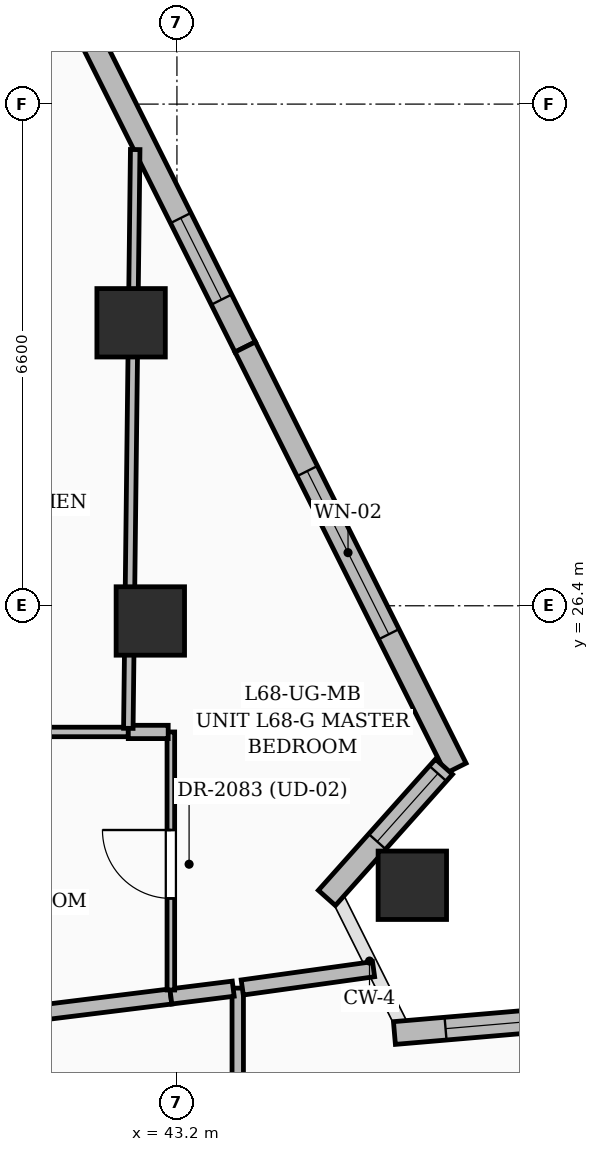
"""IFC4 building model, lengths in metres.
Left out: names, types, materials, properties, quantities, classifications, styles, units other than length and angle.
Written with IfcOpenShell. Run it as: python <this file> out.ifc"""

import sys

from ifc_helpers import new_model, si_unit, direction, frame, frame_2d, origin, origin_2d, place, context, subcontext, project, spatial, rectangle, extrude, element, fill, save


model = new_model("IFC4")
c1 = context("Model", 3, precision=1e-05, world=origin(), true_north=direction((0.0, 1.0)))
c2 = subcontext(c1, "Body", "Model", "MODEL_VIEW")
j1 = project(units=[si_unit("LENGTHUNIT", "METRE"), si_unit("PLANEANGLEUNIT", "RADIAN")], contexts=[c1])
p1 = place(None, origin())
s1 = spatial("IfcSite", under=j1, at=p1, CompositionType="ELEMENT")
p2 = place(p1, origin())
s2 = spatial("IfcBuilding", under=s1, at=p2, CompositionType="ELEMENT")
p3 = place(p2, frame((0.0, 0.0, 263.25)))
s3 = spatial("IfcBuildingStorey", under=s2, at=p3, CompositionType="ELEMENT", Elevation=263.25)
for number, where, z_axis, x_axis in (
    (1, (42.85, 26.2, 0.0), (0.0, 0.0, 1.0), (1.0, 0.0, 0.0)),
    (2, (46.297, 22.723, 0.0), (0.0, 0.0, 1.0), (1.0, 0.0, 0.0)),
    (3, (42.597, 30.123, 0.0), (0.0, 0.0, 1.0), (1.0, 0.0, 0.0)),
):
    element("IfcColumn", number, at=place(p3, frame(where, z_axis=z_axis, x_axis=x_axis)), inside=s3, PredefinedType="COLUMN", context=c2, shape_type="SweptSolid", body=[
        extrude(rectangle(XDim=0.9, YDim=0.9, at=origin_2d()), origin(), (0.0, 0.0, 1.0), 3.75),
    ])
p4 = place(p3, frame((41.59, 34.82, 0.0), z_axis=(0.0, 0.0, 1.0), x_axis=(0.4472135955, -0.894427191, 0.0)))
e4 = element("IfcWall", 4, at=p4, inside=s3, PredefinedType="SOLIDWALL", context=c2, shape_type="SweptSolid", body=[
    extrude(rectangle(XDim=5.607, YDim=0.3, at=frame_2d((2.804, 0.0))), origin(), (0.0, 0.0, 1.0), 3.5),
])
p5 = place(p4, frame((3.71, 0.0, 0.8)))
e5 = element("IfcOpeningElement", 5, at=p5, cuts=e4, PredefinedType="OPENING", context=c2, shape_type="SweptSolid", body=[
    extrude(rectangle(XDim=1.2, YDim=1.8, at=frame_2d((0.6, 0.9))), frame((0.0, 0.16, 0.0), z_axis=(0.0, -1.0, 0.0), x_axis=(1.0, 0.0, 0.0)), (0.0, 0.0, 1.0), 0.32),
])
p6 = place(p3, frame((44.098, 29.804, 0.0), z_axis=(0.0, 0.0, 1.0), x_axis=(0.447260869873, -0.894403552252, 0.0)))
e6 = element("IfcWall", 6, at=p6, inside=s3, PredefinedType="SOLIDWALL", context=c2, shape_type="SweptSolid", body=[
    extrude(rectangle(XDim=6.197, YDim=0.3, at=frame_2d((3.099, 0.0))), origin(), (0.0, 0.0, 1.0), 3.5),
])
p7 = place(p6, frame((1.825, 0.0, 0.6)))
e7 = element("IfcOpeningElement", 7, at=p7, cuts=e6, PredefinedType="OPENING", context=c2, shape_type="SweptSolid", body=[
    extrude(rectangle(XDim=2.4, YDim=2.1, at=frame_2d((1.2, 1.05))), frame((0.0, 0.16, 0.0), z_axis=(0.0, -1.0, 0.0), x_axis=(1.0, 0.0, 0.0)), (0.0, 0.0, 1.0), 0.32),
])
p8 = place(p3, frame((46.714, 24.282, 0.0), z_axis=(0.0, 0.0, 1.0), x_axis=(-0.665980118588, -0.745969491095, 0.0)))
e8 = element("IfcWall", 8, at=p8, inside=s3, PredefinedType="SOLIDWALL", context=c2, shape_type="SweptSolid", body=[
    extrude(rectangle(XDim=2.313, YDim=0.3, at=frame_2d((1.157, 0.0))), origin(), (0.0, 0.0, 1.0), 2.825),
])
p9 = place(p8, frame((0.12, 0.0, 0.8)))
e9 = element("IfcOpeningElement", 9, at=p9, cuts=e8, PredefinedType="OPENING", context=c2, shape_type="SweptSolid", body=[
    extrude(rectangle(XDim=1.2, YDim=1.8, at=frame_2d((0.6, 0.9))), frame((0.0, 0.16, 0.0), z_axis=(0.0, -1.0, 0.0), x_axis=(1.0, 0.0, 0.0)), (0.0, 0.0, 1.0), 0.32),
])
p10 = place(p3, frame((46.062, 20.779, 0.0), z_axis=(0.0, 0.0, 1.0), x_axis=(0.996364250233, 0.085195544828, 0.0)))
e10 = element("IfcWall", 10, at=p10, inside=s3, PredefinedType="SOLIDWALL", context=c2, shape_type="SweptSolid", body=[
    extrude(rectangle(XDim=2.594, YDim=0.3, at=frame_2d((1.297, 0.0))), origin(), (0.0, 0.0, 1.0), 2.825),
])
p11 = place(p10, frame((0.675, 0.0, 0.8)))
e11 = element("IfcOpeningElement", 11, at=p11, cuts=e10, PredefinedType="OPENING", context=c2, shape_type="SweptSolid", body=[
    extrude(rectangle(XDim=1.2, YDim=1.8, at=frame_2d((0.6, 0.9))), frame((0.0, 0.16, 0.0), z_axis=(0.0, -1.0, 0.0), x_axis=(1.0, 0.0, 0.0)), (0.0, 0.0, 1.0), 0.32),
])
p12 = place(p3, frame((44.0, 21.37, 0.0), z_axis=(0.0, 0.0, 1.0), x_axis=(0.0, -1.0, 0.0)))
e12 = element("IfcWall", 12, at=p12, inside=s3, PredefinedType="PARTITIONING", context=c2, shape_type="SweptSolid", body=[
    extrude(rectangle(XDim=3.935, YDim=0.15, at=frame_2d((1.968, 0.0))), origin(), (0.0, 0.0, 1.0), 3.5),
])
p13 = place(p3, frame((45.787, 21.619, 0.0), z_axis=(0.0, 0.0, 1.0), x_axis=(-0.99045250239, -0.137854417812, 0.0)))
e13 = element("IfcWall", 13, at=p13, inside=s3, PredefinedType="PARTITIONING", context=c2, shape_type="SweptSolid", body=[
    extrude(rectangle(XDim=1.744, YDim=0.2, at=frame_2d((0.872, 0.0))), origin(), (0.0, 0.0, 1.0), 2.685),
])
p14 = place(p3, frame((43.12, 21.26, 0.0), z_axis=(0.0, 0.0, 1.0), x_axis=(-0.992399953156, -0.123054187154, 0.0)))
e14 = element("IfcWall", 14, at=p14, inside=s3, PredefinedType="PARTITIONING", context=c2, shape_type="SweptSolid", body=[
    extrude(rectangle(XDim=4.873, YDim=0.2, at=frame_2d((2.437, 0.0))), origin(), (0.0, 0.0, 1.0), 3.5),
])
p15 = place(p3, frame((43.94, 21.363, 0.0), z_axis=(0.0, 0.0, 1.0), x_axis=(-0.992277876714, -0.124034734589, 0.0)))
e15 = element("IfcWall", 15, at=p15, inside=s3, PredefinedType="PARTITIONING", context=c2, shape_type="SweptSolid", body=[
    extrude(rectangle(XDim=0.827, YDim=0.2, at=frame_2d((0.413, 0.0))), origin(), (0.0, 0.0, 1.0), 3.5),
])
p16 = place(p3, frame((42.56, 24.74, 0.0), z_axis=(0.0, 0.0, 1.0), x_axis=(-1.0, 0.0, 0.0)))
e16 = element("IfcWall", 16, at=p16, inside=s3, PredefinedType="PARTITIONING", context=c2, shape_type="SweptSolid", body=[
    extrude(rectangle(XDim=4.15, YDim=0.125, at=frame_2d((2.075, 0.0))), origin(), (0.0, 0.0, 1.0), 3.5),
])
p17 = place(p16, frame((1.658, 0.0, 0.0)))
e17 = element("IfcOpeningElement", 17, at=p17, cuts=e16, PredefinedType="OPENING", context=c2, shape_type="SweptSolid", body=[
    extrude(rectangle(XDim=0.95, YDim=2.2, at=frame_2d((0.475, 1.1))), frame((0.0, 0.072, 0.0), z_axis=(0.0, -1.0, 0.0), x_axis=(1.0, 0.0, 0.0)), (0.0, 0.0, 1.0), 0.145),
])
p18 = place(p3, frame((43.12, 21.345, 0.0), z_axis=(0.0, 0.0, 1.0), x_axis=(0.0, 1.0, 0.0)))
e18 = element("IfcWall", 18, at=p18, inside=s3, PredefinedType="PARTITIONING", context=c2, shape_type="SweptSolid", body=[
    extrude(rectangle(XDim=3.395, YDim=0.1, at=frame_2d((1.698, 0.0))), origin(), (0.0, 0.0, 1.0), 2.685),
])
p19 = place(p18, frame((1.205, 0.0, 0.0)))
e19 = element("IfcOpeningElement", 19, at=p19, cuts=e18, PredefinedType="OPENING", context=c2, shape_type="SweptSolid", body=[
    extrude(rectangle(XDim=0.9, YDim=2.15, at=frame_2d((0.45, 1.075))), frame((0.0, 0.06, 0.0), z_axis=(0.0, -1.0, 0.0), x_axis=(1.0, 0.0, 0.0)), (0.0, 0.0, 1.0), 0.12),
])
p20 = place(p3, frame((43.085, 24.74, 0.0), z_axis=(0.0, 0.0, 1.0), x_axis=(-1.0, 0.0, 0.0)))
e20 = element("IfcWall", 20, at=p20, inside=s3, PredefinedType="PARTITIONING", context=c2, shape_type="SweptSolid", body=[
    extrude(rectangle(XDim=0.525, YDim=0.175, at=frame_2d((0.262, 0.0))), origin(), (0.0, 0.0, 1.0), 3.5),
])
p21 = place(p3, frame((42.561, 24.788, 0.0), z_axis=(0.0, 0.0, 1.0), x_axis=(0.011862322193, 0.999929640181, 0.0)))
e21 = element("IfcWall", 21, at=p21, inside=s3, PredefinedType="PARTITIONING", context=c2, shape_type="SweptSolid", body=[
    extrude(rectangle(XDim=7.615, YDim=0.125, at=frame_2d((3.808, 0.0))), origin(), (0.0, 0.0, 1.0), 2.764),
])
p22 = place(p5, origin())
e22 = element("IfcWindow", 22, at=p22, inside=s3, PartitioningType="SINGLE_PANEL", PredefinedType="WINDOW", context=c2, shape_type="SweptSolid", body=[
    extrude(rectangle(XDim=1.2, YDim=1.8, at=frame_2d((0.6, 0.9))), frame((0.0, 0.03, 0.0), z_axis=(0.0, -1.0, 0.0), x_axis=(1.0, 0.0, 0.0)), (0.0, 0.0, 1.0), 0.06),
])
fill(e5, e22)
p23 = place(p7, origin())
e23 = element("IfcWindow", 23, at=p23, inside=s3, PartitioningType="SINGLE_PANEL", PredefinedType="WINDOW", context=c2, shape_type="SweptSolid", body=[
    extrude(rectangle(XDim=2.4, YDim=2.1, at=frame_2d((1.2, 1.05))), frame((0.0, 0.03, 0.0), z_axis=(0.0, -1.0, 0.0), x_axis=(1.0, 0.0, 0.0)), (0.0, 0.0, 1.0), 0.06),
])
fill(e7, e23)
p24 = place(p9, origin())
e24 = element("IfcWindow", 24, at=p24, inside=s3, PartitioningType="SINGLE_PANEL", PredefinedType="WINDOW", context=c2, shape_type="SweptSolid", body=[
    extrude(rectangle(XDim=1.2, YDim=1.8, at=frame_2d((0.6, 0.9))), frame((0.0, 0.03, 0.0), z_axis=(0.0, -1.0, 0.0), x_axis=(1.0, 0.0, 0.0)), (0.0, 0.0, 1.0), 0.06),
])
fill(e9, e24)
p25 = place(p11, origin())
e25 = element("IfcWindow", 25, at=p25, inside=s3, PartitioningType="SINGLE_PANEL", PredefinedType="WINDOW", context=c2, shape_type="SweptSolid", body=[
    extrude(rectangle(XDim=1.2, YDim=1.8, at=frame_2d((0.6, 0.9))), frame((0.0, 0.03, 0.0), z_axis=(0.0, -1.0, 0.0), x_axis=(1.0, 0.0, 0.0)), (0.0, 0.0, 1.0), 0.06),
])
fill(e11, e25)
p26 = place(p19, origin())
e26 = element("IfcDoor", 26, at=p26, inside=s3, OperationType="SINGLE_SWING_RIGHT", PredefinedType="DOOR", context=c2, shape_type="SweptSolid", body=[
    extrude(rectangle(XDim=0.9, YDim=2.15, at=frame_2d((0.45, 1.075))), frame((0.0, 0.025, 0.0), z_axis=(0.0, -1.0, 0.0), x_axis=(1.0, 0.0, 0.0)), (0.0, 0.0, 1.0), 0.05),
])
fill(e19, e26)
save(model, sys.argv[1])
